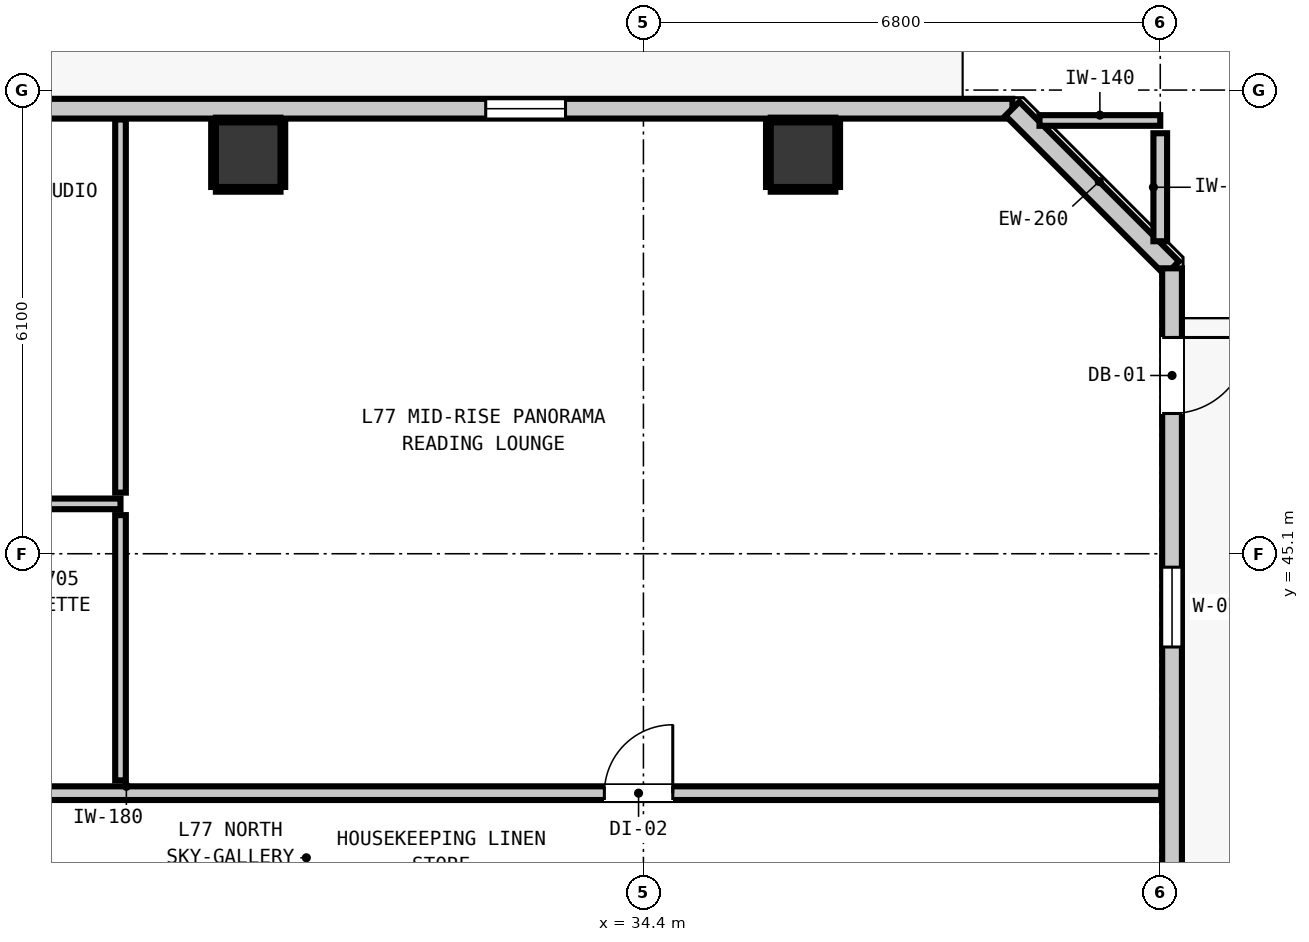
"""IFC4 building model, lengths in metres.
Left out: names, types, materials, properties, quantities, classifications, styles, units other than length and angle.
Written with IfcOpenShell. Run it as: python <this file> out.ifc"""

import sys

from ifc_helpers import new_model, si_unit, direction, frame, frame_2d, origin, origin_2d, place, context, subcontext, project, spatial, rectangle, extrude, element, fill, save


model = new_model("IFC4")
c1 = context("Model", 3, precision=1e-05, world=origin(), true_north=direction((0.0, 1.0)))
c2 = subcontext(c1, "Body", "Model", "MODEL_VIEW")
j1 = project(units=[si_unit("LENGTHUNIT", "METRE"), si_unit("PLANEANGLEUNIT", "RADIAN")], contexts=[c1])
p1 = place(None, origin())
s1 = spatial("IfcSite", under=j1, at=p1, CompositionType="ELEMENT")
p2 = place(p1, origin())
s2 = spatial("IfcBuilding", under=s1, at=p2, CompositionType="ELEMENT")
p3 = place(p2, frame((0.0, 0.0, 265.56)))
s3 = spatial("IfcBuildingStorey", under=s2, at=p3, CompositionType="ELEMENT", Elevation=265.56)
for number, where, z_axis, x_axis in (
    (1, (29.2, 50.35, 0.0), (0.0, 0.0, 1.0), (1.0, 0.0, 0.0)),
    (2, (36.5, 50.35, 0.0), (0.0, 0.0, 1.0), (1.0, 0.0, 0.0)),
):
    element("IfcColumn", number, at=place(p3, frame(where, z_axis=z_axis, x_axis=x_axis)), inside=s3, PredefinedType="COLUMN", context=c2, shape_type="SweptSolid", body=[
        extrude(rectangle(XDim=0.85, YDim=0.85, at=origin_2d()), origin(), (0.0, 0.0, 1.0), 3.32),
    ])
p4 = place(p3, frame((6.545, 50.955, 0.0), z_axis=(0.0, 0.0, 1.0), x_axis=(1.0, 0.0, 0.0)))
e3 = element("IfcWall", 3, at=p4, inside=s3, PredefinedType="STANDARD", context=c2, shape_type="SweptSolid", body=[
    extrude(rectangle(XDim=32.71, YDim=0.26, at=frame_2d((16.355, 0.0))), origin(), (0.0, 0.0, 1.0), 3.1),
])
p5 = place(p4, frame((2.665, 0.0, 0.0)))
e4 = element("IfcOpeningElement", 4, at=p5, cuts=e3, PredefinedType="OPENING", context=c2, shape_type="SweptSolid", body=[
    extrude(rectangle(XDim=1.0, YDim=2.15, at=frame_2d((0.5, 1.075))), frame((0.0, 0.14, 0.0), z_axis=(0.0, -1.0, 0.0), x_axis=(1.0, 0.0, 0.0)), (0.0, 0.0, 1.0), 0.28),
])
p6 = place(p4, frame((4.623, 0.0, 0.85)))
e5 = element("IfcOpeningElement", 5, at=p6, cuts=e3, PredefinedType="OPENING", context=c2, shape_type="SweptSolid", body=[
    extrude(rectangle(XDim=1.05, YDim=1.65, at=frame_2d((0.525, 0.825))), frame((0.0, 0.14, 0.0), z_axis=(0.0, -1.0, 0.0), x_axis=(1.0, 0.0, 0.0)), (0.0, 0.0, 1.0), 0.28),
])
p7 = place(p4, frame((0.434, 0.0, 0.85)))
e6 = element("IfcOpeningElement", 6, at=p7, cuts=e3, PredefinedType="OPENING", context=c2, shape_type="SweptSolid", body=[
    extrude(rectangle(XDim=1.05, YDim=1.65, at=frame_2d((0.525, 0.825))), frame((0.0, 0.14, 0.0), z_axis=(0.0, -1.0, 0.0), x_axis=(1.0, 0.0, 0.0)), (0.0, 0.0, 1.0), 0.28),
])
p8 = place(p4, frame((15.752, 0.0, 0.85)))
e7 = element("IfcOpeningElement", 7, at=p8, cuts=e3, PredefinedType="OPENING", context=c2, shape_type="SweptSolid", body=[
    extrude(rectangle(XDim=1.05, YDim=1.65, at=frame_2d((0.525, 0.825))), frame((0.0, 0.14, 0.0), z_axis=(0.0, -1.0, 0.0), x_axis=(1.0, 0.0, 0.0)), (0.0, 0.0, 1.0), 0.28),
])
p9 = place(p4, frame((25.78, 0.0, 0.85)))
e8 = element("IfcOpeningElement", 8, at=p9, cuts=e3, PredefinedType="OPENING", context=c2, shape_type="SweptSolid", body=[
    extrude(rectangle(XDim=1.05, YDim=1.65, at=frame_2d((0.525, 0.825))), frame((0.0, 0.14, 0.0), z_axis=(0.0, -1.0, 0.0), x_axis=(1.0, 0.0, 0.0)), (0.0, 0.0, 1.0), 0.28),
])
p10 = place(p3, frame((39.255, 50.955, 0.0), z_axis=(0.0, 0.0, 1.0), x_axis=(0.707106781187, -0.707106781187, 0.0)))
e9 = element("IfcWall", 9, at=p10, inside=s3, PredefinedType="STANDARD", context=c2, shape_type="SweptSolid", body=[
    extrude(rectangle(XDim=2.97, YDim=0.26, at=frame_2d((1.485, 0.0))), origin(), (0.0, 0.0, 1.0), 3.1),
])
p11 = place(p3, frame((41.355, 48.855, 0.0), z_axis=(0.0, 0.0, 1.0), x_axis=(0.0, -1.0, 0.0)))
e10 = element("IfcWall", 10, at=p11, inside=s3, PredefinedType="STANDARD", context=c2, shape_type="SweptSolid", body=[
    extrude(rectangle(XDim=30.31, YDim=0.26, at=frame_2d((15.155, 0.0))), origin(), (0.0, 0.0, 1.0), 3.1),
])
p12 = place(p11, frame((0.91, 0.0, 0.0)))
e11 = element("IfcOpeningElement", 11, at=p12, cuts=e10, PredefinedType="OPENING", context=c2, shape_type="SweptSolid", body=[
    extrude(rectangle(XDim=1.0, YDim=2.15, at=frame_2d((0.5, 1.075))), frame((0.0, 0.14, 0.0), z_axis=(0.0, -1.0, 0.0), x_axis=(1.0, 0.0, 0.0)), (0.0, 0.0, 1.0), 0.28),
])
p13 = place(p11, frame((3.932, 0.0, 0.85)))
e12 = element("IfcOpeningElement", 12, at=p13, cuts=e10, PredefinedType="OPENING", context=c2, shape_type="SweptSolid", body=[
    extrude(rectangle(XDim=1.05, YDim=1.65, at=frame_2d((0.525, 0.825))), frame((0.0, 0.14, 0.0), z_axis=(0.0, -1.0, 0.0), x_axis=(1.0, 0.0, 0.0)), (0.0, 0.0, 1.0), 0.28),
])
p14 = place(p3, frame((4.587, 41.95, 0.0), z_axis=(0.0, 0.0, 1.0), x_axis=(1.0, 0.0, 0.0)))
e13 = element("IfcWall", 13, at=p14, inside=s3, PredefinedType="PARTITIONING", context=c2, shape_type="SweptSolid", body=[
    extrude(rectangle(XDim=36.626, YDim=0.18, at=frame_2d((18.313, 0.0))), origin(), (0.0, 0.0, 1.0), 3.1),
])
p15 = place(p14, frame((6.639, 0.0, 0.0)))
e14 = element("IfcOpeningElement", 14, at=p15, cuts=e13, PredefinedType="OPENING", context=c2, shape_type="SweptSolid", body=[
    extrude(rectangle(XDim=1.0, YDim=2.15, at=frame_2d((0.5, 1.075))), frame((0.0, 0.1, 0.0), z_axis=(0.0, -1.0, 0.0), x_axis=(1.0, 0.0, 0.0)), (0.0, 0.0, 1.0), 0.2),
])
p16 = place(p14, frame((15.721, 0.0, 0.0)))
e15 = element("IfcOpeningElement", 15, at=p16, cuts=e13, PredefinedType="OPENING", context=c2, shape_type="SweptSolid", body=[
    extrude(rectangle(XDim=1.0, YDim=2.15, at=frame_2d((0.5, 1.075))), frame((0.0, 0.1, 0.0), z_axis=(0.0, -1.0, 0.0), x_axis=(1.0, 0.0, 0.0)), (0.0, 0.0, 1.0), 0.2),
])
p17 = place(p14, frame((29.299, 0.0, 0.0)))
e16 = element("IfcOpeningElement", 16, at=p17, cuts=e13, PredefinedType="OPENING", context=c2, shape_type="SweptSolid", body=[
    extrude(rectangle(XDim=0.9, YDim=2.1, at=frame_2d((0.45, 1.05))), frame((0.0, 0.1, 0.0), z_axis=(0.0, -1.0, 0.0), x_axis=(1.0, 0.0, 0.0)), (0.0, 0.0, 1.0), 0.2),
])
p18 = place(p3, frame((24.52, 45.756, 0.0), z_axis=(0.0, 0.0, 1.0), x_axis=(1.0, 0.0, 0.0)))
e17 = element("IfcWall", 17, at=p18, inside=s3, PredefinedType="PARTITIONING", context=c2, shape_type="SweptSolid", body=[
    extrude(rectangle(XDim=3.0, YDim=0.14, at=frame_2d((1.5, 0.0))), origin(), (0.0, 0.0, 1.0), 3.1),
])
p19 = place(p3, frame((39.611, 50.8, 0.0), z_axis=(0.0, 0.0, 1.0), x_axis=(1.0, 0.0, 0.0)))
e18 = element("IfcWall", 18, at=p19, inside=s3, PredefinedType="PARTITIONING", context=c2, shape_type="SweptSolid", body=[
    extrude(rectangle(XDim=1.589, YDim=0.14, at=frame_2d((0.794, 0.0))), origin(), (0.0, 0.0, 1.0), 3.1),
])
p20 = place(p3, frame((41.2, 49.211, 0.0), z_axis=(0.0, 0.0, 1.0), x_axis=(0.0, 1.0, 0.0)))
e19 = element("IfcWall", 19, at=p20, inside=s3, PredefinedType="PARTITIONING", context=c2, shape_type="SweptSolid", body=[
    extrude(rectangle(XDim=1.421, YDim=0.18, at=frame_2d((0.71, 0.0))), origin(), (0.0, 0.0, 1.0), 3.1),
])
p21 = place(p3, frame((27.52, 42.118, 0.0), z_axis=(0.0, 0.0, 1.0), x_axis=(0.0, 1.0, 0.0)))
e20 = element("IfcWall", 20, at=p21, inside=s3, PredefinedType="PARTITIONING", context=c2, shape_type="SweptSolid", body=[
    extrude(rectangle(XDim=3.49, YDim=0.14, at=frame_2d((1.745, 0.0))), origin(), (0.0, 0.0, 1.0), 3.1),
])
p22 = place(p3, frame((27.52, 45.904, 0.0), z_axis=(0.0, 0.0, 1.0), x_axis=(0.0, 1.0, 0.0)))
e21 = element("IfcWall", 21, at=p22, inside=s3, PredefinedType="PARTITIONING", context=c2, shape_type="SweptSolid", body=[
    extrude(rectangle(XDim=4.909, YDim=0.14, at=frame_2d((2.455, 0.0))), origin(), (0.0, 0.0, 1.0), 3.1),
])
for number, where, z_axis, x_axis in (
    (22, (28.775, 49.893, 0.0), (0.0, 0.0, 1.0), (1.0, 0.0, 0.0)),
    (23, (28.775, 50.807, 0.0), (0.0, 0.0, 1.0), (1.0, 0.0, 0.0)),
):
    element("IfcWall", number, at=place(p3, frame(where, z_axis=z_axis, x_axis=x_axis)), inside=s3, PredefinedType="PARTITIONING", context=c2, shape_type="SweptSolid", body=[
        extrude(rectangle(XDim=0.85, YDim=0.06, at=frame_2d((0.425, 0.0))), origin(), (0.0, 0.0, 1.0), 1.45),
    ])
for number, where, z_axis, x_axis in (
    (24, (28.743, 49.925, 0.0), (0.0, 0.0, 1.0), (0.0, 1.0, 0.0)),
    (25, (29.657, 49.925, 0.0), (0.0, 0.0, 1.0), (0.0, 1.0, 0.0)),
):
    element("IfcWall", number, at=place(p3, frame(where, z_axis=z_axis, x_axis=x_axis)), inside=s3, PredefinedType="PARTITIONING", context=c2, shape_type="SweptSolid", body=[
        extrude(rectangle(XDim=0.85, YDim=0.06, at=frame_2d((0.425, 0.0))), origin(), (0.0, 0.0, 1.0), 1.45),
    ])
for number, where, z_axis, x_axis in (
    (26, (36.075, 49.893, 0.0), (0.0, 0.0, 1.0), (1.0, 0.0, 0.0)),
    (27, (36.075, 50.807, 0.0), (0.0, 0.0, 1.0), (1.0, 0.0, 0.0)),
):
    element("IfcWall", number, at=place(p3, frame(where, z_axis=z_axis, x_axis=x_axis)), inside=s3, PredefinedType="PARTITIONING", context=c2, shape_type="SweptSolid", body=[
        extrude(rectangle(XDim=0.85, YDim=0.06, at=frame_2d((0.425, 0.0))), origin(), (0.0, 0.0, 1.0), 1.45),
    ])
for number, where, z_axis, x_axis in (
    (28, (36.043, 49.925, 0.0), (0.0, 0.0, 1.0), (0.0, 1.0, 0.0)),
    (29, (36.957, 49.925, 0.0), (0.0, 0.0, 1.0), (0.0, 1.0, 0.0)),
):
    element("IfcWall", number, at=place(p3, frame(where, z_axis=z_axis, x_axis=x_axis)), inside=s3, PredefinedType="PARTITIONING", context=c2, shape_type="SweptSolid", body=[
        extrude(rectangle(XDim=0.85, YDim=0.06, at=frame_2d((0.425, 0.0))), origin(), (0.0, 0.0, 1.0), 1.45),
    ])
p23 = place(p12, origin())
e30 = element("IfcDoor", 30, at=p23, inside=s3, OperationType="SINGLE_SWING_LEFT", PredefinedType="DOOR", context=c2, shape_type="SweptSolid", body=[
    extrude(rectangle(XDim=1.0, YDim=2.15, at=frame_2d((0.5, 1.075))), frame((0.0, 0.025, 0.0), z_axis=(0.0, -1.0, 0.0), x_axis=(1.0, 0.0, 0.0)), (0.0, 0.0, 1.0), 0.05),
])
fill(e11, e30)
p24 = place(p9, origin())
e31 = element("IfcWindow", 31, at=p24, inside=s3, PartitioningType="SINGLE_PANEL", PredefinedType="WINDOW", context=c2, shape_type="SweptSolid", body=[
    extrude(rectangle(XDim=1.05, YDim=1.65, at=frame_2d((0.525, 0.825))), frame((0.0, 0.03, 0.0), z_axis=(0.0, -1.0, 0.0), x_axis=(1.0, 0.0, 0.0)), (0.0, 0.0, 1.0), 0.06),
])
fill(e8, e31)
p25 = place(p13, origin())
e32 = element("IfcWindow", 32, at=p25, inside=s3, PartitioningType="SINGLE_PANEL", PredefinedType="WINDOW", context=c2, shape_type="SweptSolid", body=[
    extrude(rectangle(XDim=1.05, YDim=1.65, at=frame_2d((0.525, 0.825))), frame((0.0, 0.03, 0.0), z_axis=(0.0, -1.0, 0.0), x_axis=(1.0, 0.0, 0.0)), (0.0, 0.0, 1.0), 0.06),
])
fill(e12, e32)
p26 = place(p17, origin())
e33 = element("IfcDoor", 33, at=p26, inside=s3, OperationType="SINGLE_SWING_RIGHT", PredefinedType="DOOR", context=c2, shape_type="SweptSolid", body=[
    extrude(rectangle(XDim=0.9, YDim=2.1, at=frame_2d((0.45, 1.05))), frame((0.0, 0.025, 0.0), z_axis=(0.0, -1.0, 0.0), x_axis=(1.0, 0.0, 0.0)), (0.0, 0.0, 1.0), 0.05),
])
fill(e16, e33)
save(model, sys.argv[1])
